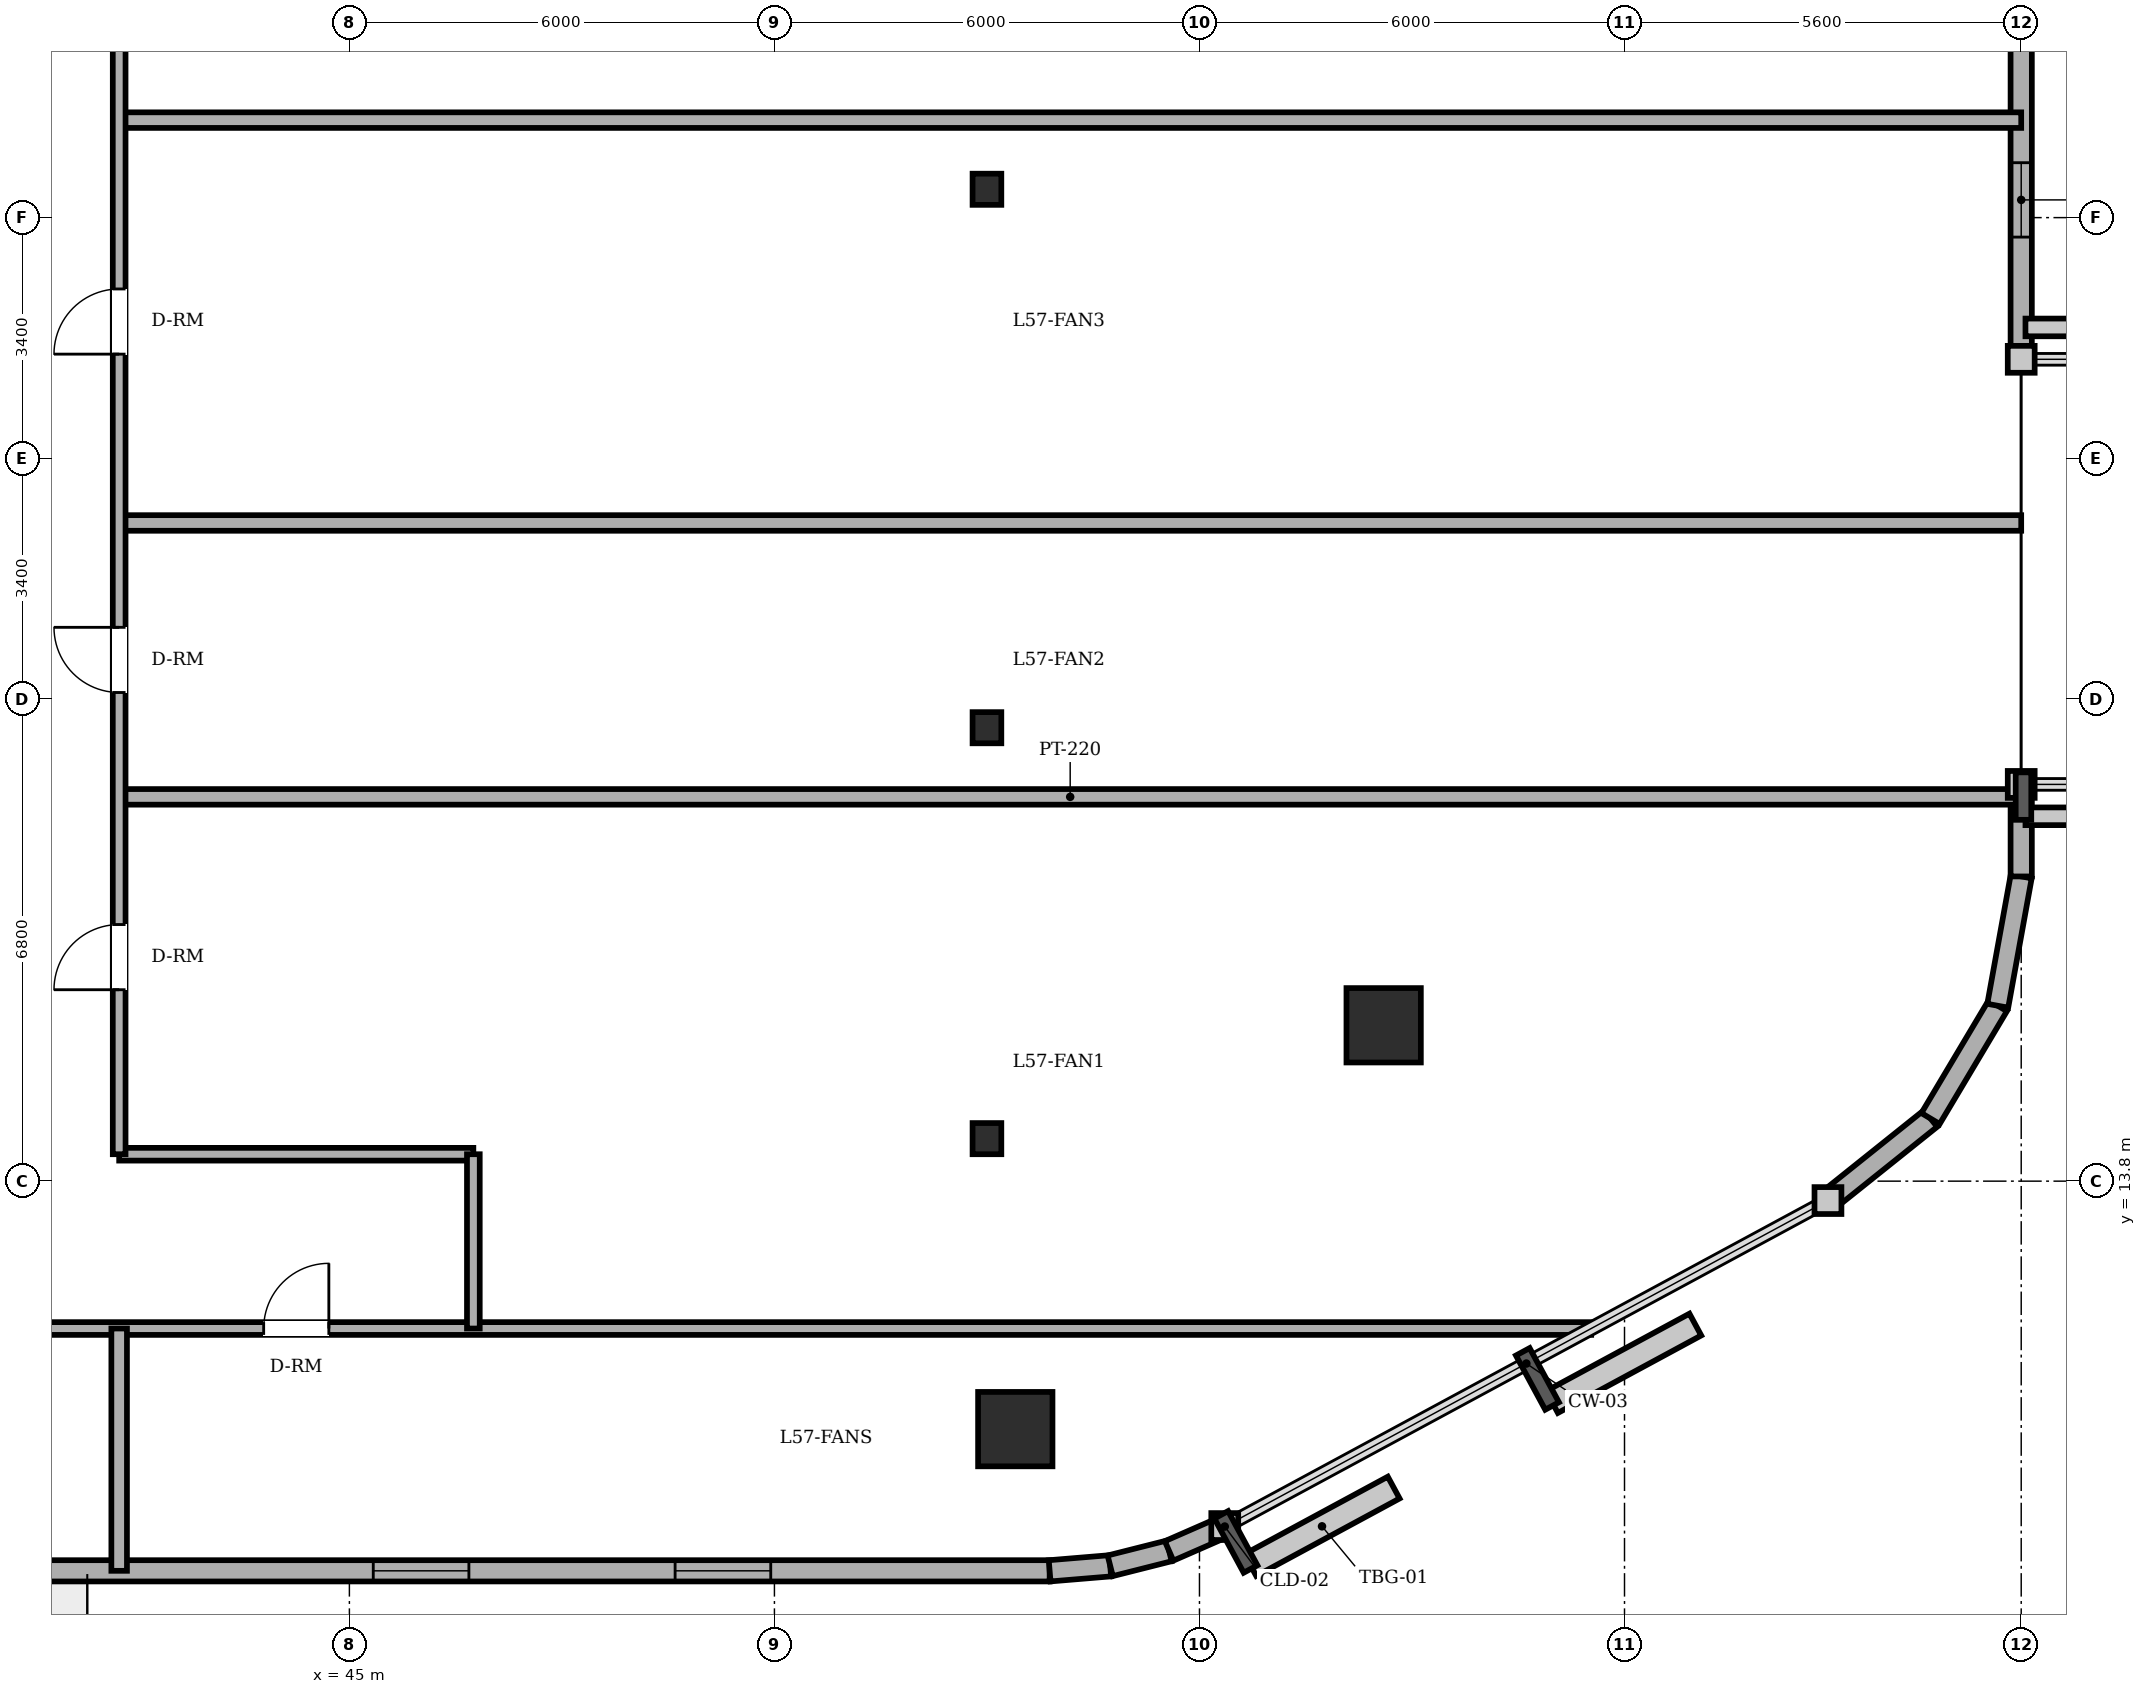
"""IFC4 building model, lengths in metres.
Left out: names, types, materials, properties, quantities, classifications, styles, units other than length and angle.
Written with IfcOpenShell. Run it as: python <this file> out.ifc"""

import sys

from ifc_helpers import new_model, si_unit, direction, frame, frame_2d, origin, origin_2d, place, context, subcontext, project, spatial, rectangle, circle, i_section, extrude, element, fill, save


model = new_model("IFC4")
c1 = context("Model", 3, precision=1e-05, world=origin(), true_north=direction((0.0, 1.0)))
c2 = subcontext(c1, "Body", "Model", "MODEL_VIEW")
j1 = project(units=[si_unit("LENGTHUNIT", "METRE"), si_unit("PLANEANGLEUNIT", "RADIAN")], contexts=[c1])
p1 = place(None, origin())
s1 = spatial("IfcSite", under=j1, at=p1, CompositionType="ELEMENT")
p2 = place(p1, origin())
s2 = spatial("IfcBuilding", under=s1, at=p2, CompositionType="ELEMENT")
p3 = place(p2, frame((0.0, 0.0, 219.3)))
s3 = spatial("IfcBuildingStorey", under=s2, at=p3, CompositionType="ELEMENT", Elevation=219.3)
for number, where, z_axis, x_axis in (
    (1, (54.4, 10.3, 0.0), (0.0, 0.0, 1.0), (1.0, 0.0, 0.0)),
    (2, (59.6, 16.0, 0.0), (0.0, 0.0, 1.0), (1.0, 0.0, 0.0)),
):
    element("IfcColumn", number, at=place(p3, frame(where, z_axis=z_axis, x_axis=x_axis)), inside=s3, PredefinedType="COLUMN", context=c2, shape_type="SweptSolid", body=[
        extrude(circle(Radius=0.525, at=origin_2d()), origin(), (0.0, 0.0, 1.0), 3.6),
    ])
for number, where, z_axis, x_axis in (
    (3, (54.0, 14.4, 0.0), (0.0, 0.0, 1.0), (1.0, 0.0, 0.0)),
    (4, (54.0, 20.2, 0.0), (0.0, 0.0, 1.0), (1.0, 0.0, 0.0)),
    (5, (54.0, 27.8, 0.0), (0.0, 0.0, 1.0), (1.0, 0.0, 0.0)),
):
    element("IfcColumn", number, at=place(p3, frame(where, z_axis=z_axis, x_axis=x_axis)), inside=s3, PredefinedType="COLUMN", context=c2, shape_type="SweptSolid", body=[
        extrude(i_section(OverallWidth=0.406, OverallDepth=0.44, WebThickness=0.024, FlangeThickness=0.039, FilletRadius=0.015, at=origin_2d()), origin(), (0.0, 0.0, 1.0), 3.6),
    ])
p4 = place(p3, frame((22.4, 8.3, 0.0), z_axis=(0.0, 0.0, 1.0), x_axis=(1.0, 0.0, 0.0)))
e6 = element("IfcWall", 6, at=p4, inside=s3, PredefinedType="SOLIDWALL", context=c2, shape_type="SweptSolid", body=[
    extrude(rectangle(XDim=32.485, YDim=0.3, at=frame_2d((16.243, 0.0))), origin(), (0.0, 0.0, 1.0), 3.4),
])
p5 = place(p4, frame((15.425, 0.0, 0.0)))
e7 = element("IfcOpeningElement", 7, at=p5, cuts=e6, PredefinedType="OPENING", context=c2, shape_type="SweptSolid", body=[
    extrude(rectangle(XDim=0.95, YDim=2.2, at=frame_2d((0.475, 1.1))), frame((0.0, 0.16, 0.0), z_axis=(0.0, -1.0, 0.0), x_axis=(1.0, 0.0, 0.0)), (0.0, 0.0, 1.0), 0.32),
])
p6 = place(p4, frame((1.3, 0.0, 0.85)))
e8 = element("IfcOpeningElement", 8, at=p6, cuts=e6, PredefinedType="OPENING", context=c2, shape_type="SweptSolid", body=[
    extrude(rectangle(XDim=1.35, YDim=1.55, at=frame_2d((0.675, 0.775))), frame((0.0, 0.16, 0.0), z_axis=(0.0, -1.0, 0.0), x_axis=(1.0, 0.0, 0.0)), (0.0, 0.0, 1.0), 0.32),
])
p7 = place(p4, frame((4.825, 0.0, 0.85)))
e9 = element("IfcOpeningElement", 9, at=p7, cuts=e6, PredefinedType="OPENING", context=c2, shape_type="SweptSolid", body=[
    extrude(rectangle(XDim=1.35, YDim=1.55, at=frame_2d((0.675, 0.775))), frame((0.0, 0.16, 0.0), z_axis=(0.0, -1.0, 0.0), x_axis=(1.0, 0.0, 0.0)), (0.0, 0.0, 1.0), 0.32),
])
p8 = place(p4, frame((10.708, 0.0, 0.85)))
e10 = element("IfcOpeningElement", 10, at=p8, cuts=e6, PredefinedType="OPENING", context=c2, shape_type="SweptSolid", body=[
    extrude(rectangle(XDim=1.35, YDim=1.55, at=frame_2d((0.675, 0.775))), frame((0.0, 0.16, 0.0), z_axis=(0.0, -1.0, 0.0), x_axis=(1.0, 0.0, 0.0)), (0.0, 0.0, 1.0), 0.32),
])
p9 = place(p4, frame((22.937, 0.0, 0.85)))
e11 = element("IfcOpeningElement", 11, at=p9, cuts=e6, PredefinedType="OPENING", context=c2, shape_type="SweptSolid", body=[
    extrude(rectangle(XDim=1.35, YDim=1.55, at=frame_2d((0.675, 0.775))), frame((0.0, 0.16, 0.0), z_axis=(0.0, -1.0, 0.0), x_axis=(1.0, 0.0, 0.0)), (0.0, 0.0, 1.0), 0.32),
])
p10 = place(p4, frame((27.198, 0.0, 0.85)))
e12 = element("IfcOpeningElement", 12, at=p10, cuts=e6, PredefinedType="OPENING", context=c2, shape_type="SweptSolid", body=[
    extrude(rectangle(XDim=1.35, YDim=1.55, at=frame_2d((0.675, 0.775))), frame((0.0, 0.16, 0.0), z_axis=(0.0, -1.0, 0.0), x_axis=(1.0, 0.0, 0.0)), (0.0, 0.0, 1.0), 0.32),
])
p11 = place(p3, frame((54.885, 8.3, 0.0), z_axis=(0.0, 0.0, 1.0), x_axis=(0.996565355958, 0.082809971041, 0.0)))
e13 = element("IfcWall", 13, at=p11, inside=s3, PredefinedType="SOLIDWALL", context=c2, shape_type="SweptSolid", body=[
    extrude(rectangle(XDim=0.858, YDim=0.3, at=frame_2d((0.429, 0.0))), origin(), (0.0, 0.0, 1.0), 3.4),
])
p12 = place(p3, frame((55.74, 8.371, 0.0), z_axis=(0.0, 0.0, 1.0), x_axis=(0.969536346338, 0.244947490555, 0.0)))
e14 = element("IfcWall", 14, at=p12, inside=s3, PredefinedType="SOLIDWALL", context=c2, shape_type="SweptSolid", body=[
    extrude(rectangle(XDim=0.857, YDim=0.3, at=frame_2d((0.429, 0.0))), origin(), (0.0, 0.0, 1.0), 3.4),
])
p13 = place(p3, frame((56.571, 8.581, 0.0), z_axis=(0.0, 0.0, 1.0), x_axis=(0.916085473636, 0.400983048261, 0.0)))
e15 = element("IfcWall", 15, at=p13, inside=s3, PredefinedType="SOLIDWALL", context=c2, shape_type="SweptSolid", body=[
    extrude(rectangle(XDim=0.858, YDim=0.3, at=frame_2d((0.429, 0.0))), origin(), (0.0, 0.0, 1.0), 3.4),
])
p14 = place(p3, frame((65.872, 13.526, 0.0), z_axis=(0.0, 0.0, 1.0), x_axis=(0.780920189257, 0.624630817372, 0.0)))
e16 = element("IfcWall", 16, at=p14, inside=s3, PredefinedType="SOLIDWALL", context=c2, shape_type="SweptSolid", body=[
    extrude(rectangle(XDim=1.854, YDim=0.3, at=frame_2d((0.927, 0.0))), origin(), (0.0, 0.0, 1.0), 3.4),
])
p15 = place(p3, frame((67.32, 14.684, 0.0), z_axis=(0.0, 0.0, 1.0), x_axis=(0.512072018927, 0.858942516955, 0.0)))
e17 = element("IfcWall", 17, at=p15, inside=s3, PredefinedType="SOLIDWALL", context=c2, shape_type="SweptSolid", body=[
    extrude(rectangle(XDim=1.853, YDim=0.3, at=frame_2d((0.927, 0.0))), origin(), (0.0, 0.0, 1.0), 3.4),
])
p16 = place(p3, frame((68.269, 16.276, 0.0), z_axis=(0.0, 0.0, 1.0), x_axis=(0.178468469252, 0.983945631365, 0.0)))
e18 = element("IfcWall", 18, at=p16, inside=s3, PredefinedType="SOLIDWALL", context=c2, shape_type="SweptSolid", body=[
    extrude(rectangle(XDim=1.855, YDim=0.3, at=frame_2d((0.927, 0.0))), origin(), (0.0, 0.0, 1.0), 3.4),
])
p17 = place(p3, frame((68.6, 18.101, 0.0), z_axis=(0.0, 0.0, 1.0), x_axis=(0.0, 1.0, 0.0)))
e19 = element("IfcWall", 19, at=p17, inside=s3, PredefinedType="SOLIDWALL", context=c2, shape_type="SweptSolid", body=[
    extrude(rectangle(XDim=1.299, YDim=0.3, at=frame_2d((0.649, 0.0))), origin(), (0.0, 0.0, 1.0), 3.4),
])
p18 = place(p3, frame((68.6, 25.4, 0.0), z_axis=(0.0, 0.0, 1.0), x_axis=(0.0, 1.0, 0.0)))
e20 = element("IfcWall", 20, at=p18, inside=s3, PredefinedType="SOLIDWALL", context=c2, shape_type="SweptSolid", body=[
    extrude(rectangle(XDim=4.499, YDim=0.3, at=frame_2d((2.25, 0.0))), origin(), (0.0, 0.0, 1.0), 3.4),
])
p19 = place(p18, frame((1.725, 0.0, 0.85)))
e21 = element("IfcOpeningElement", 21, at=p19, cuts=e20, PredefinedType="OPENING", context=c2, shape_type="SweptSolid", body=[
    extrude(rectangle(XDim=1.05, YDim=1.55, at=frame_2d((0.525, 0.775))), frame((0.0, 0.16, 0.0), z_axis=(0.0, -1.0, 0.0), x_axis=(1.0, 0.0, 0.0)), (0.0, 0.0, 1.0), 0.32),
])
p20 = place(p3, frame((17.677, 11.72, 0.0), z_axis=(0.0, 0.0, 1.0), x_axis=(1.0, 0.0, 0.0)))
e22 = element("IfcWall", 22, at=p20, inside=s3, PredefinedType="PARTITIONING", context=c2, shape_type="SweptSolid", body=[
    extrude(rectangle(XDim=44.853, YDim=0.18, at=frame_2d((22.427, 0.0))), origin(), (0.0, 0.0, 1.0), 3.4),
])
p21 = place(p20, frame((9.763, 0.0, 0.0)))
e23 = element("IfcOpeningElement", 23, at=p21, cuts=e22, PredefinedType="OPENING", context=c2, shape_type="SweptSolid", body=[
    extrude(rectangle(XDim=0.92, YDim=2.1, at=frame_2d((0.46, 1.05))), frame((0.0, 0.1, 0.0), z_axis=(0.0, -1.0, 0.0), x_axis=(1.0, 0.0, 0.0)), (0.0, 0.0, 1.0), 0.2),
])
p22 = place(p20, frame((26.113, 0.0, 0.0)))
e24 = element("IfcOpeningElement", 24, at=p22, cuts=e22, PredefinedType="OPENING", context=c2, shape_type="SweptSolid", body=[
    extrude(rectangle(XDim=0.92, YDim=2.1, at=frame_2d((0.46, 1.05))), frame((0.0, 0.1, 0.0), z_axis=(0.0, -1.0, 0.0), x_axis=(1.0, 0.0, 0.0)), (0.0, 0.0, 1.0), 0.2),
])
p23 = place(p20, frame((4.063, 0.0, 0.0)))
e25 = element("IfcOpeningElement", 25, at=p23, cuts=e22, PredefinedType="OPENING", context=c2, shape_type="SweptSolid", body=[
    extrude(rectangle(XDim=0.92, YDim=2.1, at=frame_2d((0.46, 1.05))), frame((0.0, 0.1, 0.0), z_axis=(0.0, -1.0, 0.0), x_axis=(1.0, 0.0, 0.0)), (0.0, 0.0, 1.0), 0.2),
])
p24 = place(p20, frame((17.638, 0.0, 0.0)))
e26 = element("IfcOpeningElement", 26, at=p24, cuts=e22, PredefinedType="OPENING", context=c2, shape_type="SweptSolid", body=[
    extrude(rectangle(XDim=0.92, YDim=2.1, at=frame_2d((0.46, 1.05))), frame((0.0, 0.1, 0.0), z_axis=(0.0, -1.0, 0.0), x_axis=(1.0, 0.0, 0.0)), (0.0, 0.0, 1.0), 0.2),
])
p25 = place(p3, frame((41.75, 14.18, 0.0), z_axis=(0.0, 0.0, 1.0), x_axis=(1.0, 0.0, 0.0)))
e27 = element("IfcWall", 27, at=p25, inside=s3, PredefinedType="PARTITIONING", context=c2, shape_type="SweptSolid", body=[
    extrude(rectangle(XDim=5.0, YDim=0.18, at=frame_2d((2.5, 0.0))), origin(), (0.0, 0.0, 1.0), 2.982),
])
for number, where, z_axis, x_axis in (
    (28, (41.75, 19.224, 0.0), (0.0, 0.0, 1.0), (1.0, 0.0, 0.0)),
    (29, (41.75, 23.09, 0.0), (0.0, 0.0, 1.0), (1.0, 0.0, 0.0)),
    (30, (41.75, 28.776, 0.0), (0.0, 0.0, 1.0), (1.0, 0.0, 0.0)),
):
    element("IfcWall", number, at=place(p3, frame(where, z_axis=z_axis, x_axis=x_axis)), inside=s3, PredefinedType="PARTITIONING", context=c2, shape_type="SweptSolid", body=[
        extrude(rectangle(XDim=26.85, YDim=0.22, at=frame_2d((13.425, 0.0))), origin(), (0.0, 0.0, 1.0), 3.4),
    ])
p26 = place(p3, frame((41.75, 8.3, 0.0), z_axis=(0.0, 0.0, 1.0), x_axis=(0.0, 1.0, 0.0)))
e31 = element("IfcWall", 31, at=p26, inside=s3, PredefinedType="PARTITIONING", context=c2, shape_type="SweptSolid", body=[
    extrude(rectangle(XDim=3.42, YDim=0.22, at=frame_2d((1.71, 0.0))), origin(), (0.0, 0.0, 1.0), 3.4),
])
p27 = place(p3, frame((41.75, 14.18, 0.0), z_axis=(0.0, 0.0, 1.0), x_axis=(0.0, 1.0, 0.0)))
e32 = element("IfcWall", 32, at=p27, inside=s3, PredefinedType="PARTITIONING", context=c2, shape_type="SweptSolid", body=[
    extrude(rectangle(XDim=19.64, YDim=0.18, at=frame_2d((9.82, 0.0))), origin(), (0.0, 0.0, 1.0), 3.4),
])
p28 = place(p27, frame((2.322, 0.0, 0.0)))
e33 = element("IfcOpeningElement", 33, at=p28, cuts=e32, PredefinedType="OPENING", context=c2, shape_type="SweptSolid", body=[
    extrude(rectangle(XDim=0.92, YDim=2.1, at=frame_2d((0.46, 1.05))), frame((0.0, 0.1, 0.0), z_axis=(0.0, -1.0, 0.0), x_axis=(1.0, 0.0, 0.0)), (0.0, 0.0, 1.0), 0.2),
])
p29 = place(p27, frame((6.517, 0.0, 0.0)))
e34 = element("IfcOpeningElement", 34, at=p29, cuts=e32, PredefinedType="OPENING", context=c2, shape_type="SweptSolid", body=[
    extrude(rectangle(XDim=0.92, YDim=2.1, at=frame_2d((0.46, 1.05))), frame((0.0, 0.1, 0.0), z_axis=(0.0, -1.0, 0.0), x_axis=(1.0, 0.0, 0.0)), (0.0, 0.0, 1.0), 0.2),
])
p30 = place(p27, frame((11.293, 0.0, 0.0)))
e35 = element("IfcOpeningElement", 35, at=p30, cuts=e32, PredefinedType="OPENING", context=c2, shape_type="SweptSolid", body=[
    extrude(rectangle(XDim=0.92, YDim=2.1, at=frame_2d((0.46, 1.05))), frame((0.0, 0.1, 0.0), z_axis=(0.0, -1.0, 0.0), x_axis=(1.0, 0.0, 0.0)), (0.0, 0.0, 1.0), 0.2),
])
p31 = place(p27, frame((16.358, 0.0, 0.0)))
e36 = element("IfcOpeningElement", 36, at=p31, cuts=e32, PredefinedType="OPENING", context=c2, shape_type="SweptSolid", body=[
    extrude(rectangle(XDim=1.0, YDim=2.15, at=frame_2d((0.5, 1.075))), frame((0.0, 0.1, 0.0), z_axis=(0.0, -1.0, 0.0), x_axis=(1.0, 0.0, 0.0)), (0.0, 0.0, 1.0), 0.2),
])
p32 = place(p3, frame((46.75, 11.72, 0.0), z_axis=(0.0, 0.0, 1.0), x_axis=(0.0, 1.0, 0.0)))
e37 = element("IfcWall", 37, at=p32, inside=s3, PredefinedType="PARTITIONING", context=c2, shape_type="SweptSolid", body=[
    extrude(rectangle(XDim=2.46, YDim=0.18, at=frame_2d((1.23, 0.0))), origin(), (0.0, 0.0, 1.0), 3.4),
])
p33 = place(p9, origin())
e38 = element("IfcWindow", 38, at=p33, inside=s3, PartitioningType="SINGLE_PANEL", PredefinedType="WINDOW", context=c2, shape_type="SweptSolid", body=[
    extrude(rectangle(XDim=1.35, YDim=1.55, at=frame_2d((0.675, 0.775))), frame((0.0, 0.03, 0.0), z_axis=(0.0, -1.0, 0.0), x_axis=(1.0, 0.0, 0.0)), (0.0, 0.0, 1.0), 0.06),
])
fill(e11, e38)
p34 = place(p10, origin())
e39 = element("IfcWindow", 39, at=p34, inside=s3, PartitioningType="SINGLE_PANEL", PredefinedType="WINDOW", context=c2, shape_type="SweptSolid", body=[
    extrude(rectangle(XDim=1.35, YDim=1.55, at=frame_2d((0.675, 0.775))), frame((0.0, 0.03, 0.0), z_axis=(0.0, -1.0, 0.0), x_axis=(1.0, 0.0, 0.0)), (0.0, 0.0, 1.0), 0.06),
])
fill(e12, e39)
p35 = place(p19, origin())
e40 = element("IfcWindow", 40, at=p35, inside=s3, PartitioningType="SINGLE_PANEL", PredefinedType="WINDOW", context=c2, shape_type="SweptSolid", body=[
    extrude(rectangle(XDim=1.05, YDim=1.55, at=frame_2d((0.525, 0.775))), frame((0.0, 0.03, 0.0), z_axis=(0.0, -1.0, 0.0), x_axis=(1.0, 0.0, 0.0)), (0.0, 0.0, 1.0), 0.06),
])
fill(e21, e40)
p36 = place(p28, origin())
e41 = element("IfcDoor", 41, at=p36, inside=s3, OperationType="SINGLE_SWING_LEFT", PredefinedType="DOOR", context=c2, shape_type="SweptSolid", body=[
    extrude(rectangle(XDim=0.92, YDim=2.1, at=frame_2d((0.46, 1.05))), frame((0.0, 0.025, 0.0), z_axis=(0.0, -1.0, 0.0), x_axis=(1.0, 0.0, 0.0)), (0.0, 0.0, 1.0), 0.05),
])
fill(e33, e41)
p37 = place(p29, origin())
e42 = element("IfcDoor", 42, at=p37, inside=s3, OperationType="SINGLE_SWING_RIGHT", PredefinedType="DOOR", context=c2, shape_type="SweptSolid", body=[
    extrude(rectangle(XDim=0.92, YDim=2.1, at=frame_2d((0.46, 1.05))), frame((0.0, 0.025, 0.0), z_axis=(0.0, -1.0, 0.0), x_axis=(1.0, 0.0, 0.0)), (0.0, 0.0, 1.0), 0.05),
])
fill(e34, e42)
p38 = place(p30, origin())
e43 = element("IfcDoor", 43, at=p38, inside=s3, OperationType="SINGLE_SWING_LEFT", PredefinedType="DOOR", context=c2, shape_type="SweptSolid", body=[
    extrude(rectangle(XDim=0.92, YDim=2.1, at=frame_2d((0.46, 1.05))), frame((0.0, 0.025, 0.0), z_axis=(0.0, -1.0, 0.0), x_axis=(1.0, 0.0, 0.0)), (0.0, 0.0, 1.0), 0.05),
])
fill(e35, e43)
p39 = place(p22, origin())
e44 = element("IfcDoor", 44, at=p39, inside=s3, OperationType="SINGLE_SWING_RIGHT", PredefinedType="DOOR", context=c2, shape_type="SweptSolid", body=[
    extrude(rectangle(XDim=0.92, YDim=2.1, at=frame_2d((0.46, 1.05))), frame((0.0, 0.025, 0.0), z_axis=(0.0, -1.0, 0.0), x_axis=(1.0, 0.0, 0.0)), (0.0, 0.0, 1.0), 0.05),
])
fill(e24, e44)
save(model, sys.argv[1])
